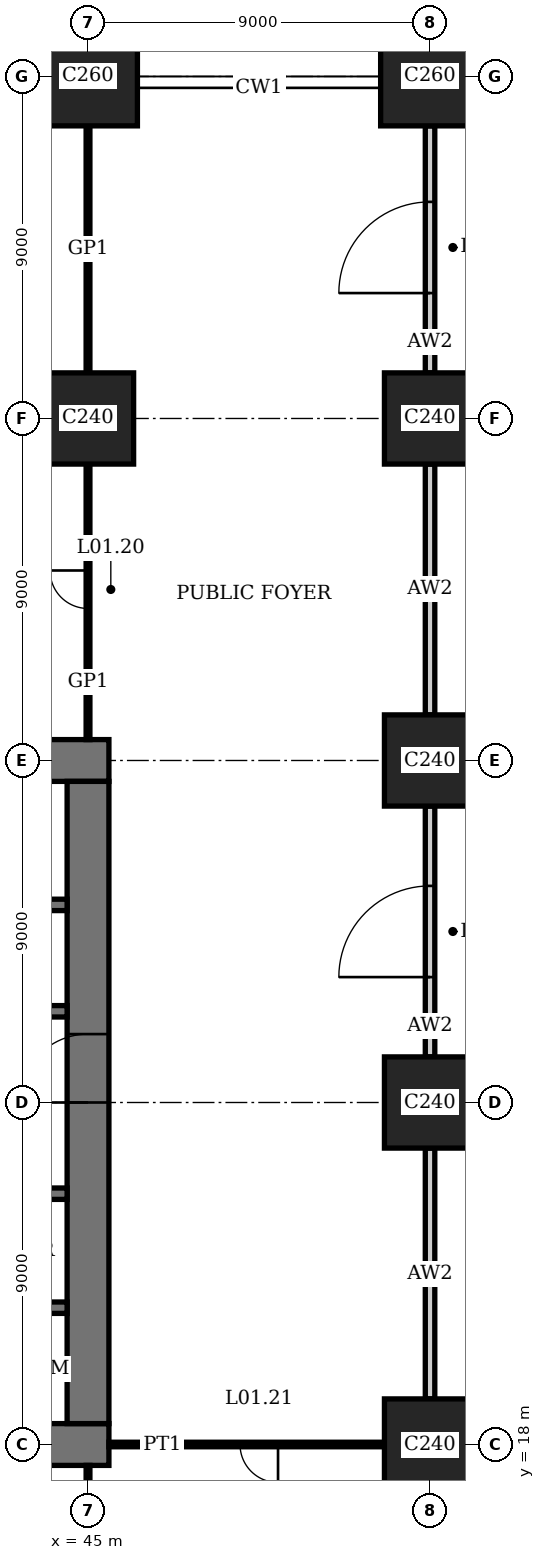
"""IFC4 building model, lengths in metres.
Left out: names, types, materials, properties, quantities, classifications, styles, units other than length and angle.
Written with IfcOpenShell. Run it as: python <this file> out.ifc"""

import sys

from ifc_helpers import new_model, si_unit, direction, frame, frame_2d, origin, origin_2d, place, context, subcontext, project, spatial, rectangle, extrude, element, fill, save


model = new_model("IFC4")
c1 = context("Model", 3, precision=1e-05, world=origin(), true_north=direction((0.0, 1.0)))
c2 = subcontext(c1, "Body", "Model", "MODEL_VIEW")
j1 = project(units=[si_unit("LENGTHUNIT", "METRE"), si_unit("PLANEANGLEUNIT", "RADIAN")], contexts=[c1])
p1 = place(None, origin())
s1 = spatial("IfcSite", under=j1, at=p1, CompositionType="ELEMENT")
p2 = place(p1, origin())
s2 = spatial("IfcBuilding", under=s1, at=p2, CompositionType="ELEMENT")
p3 = place(p2, frame((0.0, 0.0, 5.4)))
s3 = spatial("IfcBuildingStorey", under=s2, at=p3, CompositionType="ELEMENT", Elevation=5.4)
p4 = place(p3, frame((45.0, 45.0, 0.0), z_axis=(0.0, 0.0, 1.0), x_axis=(1.0, 0.0, 0.0)))
e1 = element("IfcColumn", 1, at=p4, inside=s3, PredefinedType="COLUMN", context=c2, shape_type="SweptSolid", body=[
    extrude(rectangle(XDim=2.4, YDim=2.4, at=origin_2d()), origin(), (0.0, 0.0, 1.0), 5.4),
])
p5 = place(p3, frame((45.0, 54.0, 0.0), z_axis=(0.0, 0.0, 1.0), x_axis=(1.0, 0.0, 0.0)))
e2 = element("IfcColumn", 2, at=p5, inside=s3, PredefinedType="COLUMN", context=c2, shape_type="SweptSolid", body=[
    extrude(rectangle(XDim=2.6, YDim=2.6, at=origin_2d()), origin(), (0.0, 0.0, 1.0), 5.4),
])
for number, where, z_axis, x_axis in (
    (3, (54.0, 18.0, 0.0), (0.0, 0.0, 1.0), (1.0, 0.0, 0.0)),
    (4, (54.0, 27.0, 0.0), (0.0, 0.0, 1.0), (1.0, 0.0, 0.0)),
    (5, (54.0, 36.0, 0.0), (0.0, 0.0, 1.0), (1.0, 0.0, 0.0)),
    (6, (54.0, 45.0, 0.0), (0.0, 0.0, 1.0), (1.0, 0.0, 0.0)),
):
    element("IfcColumn", number, at=place(p3, frame(where, z_axis=z_axis, x_axis=x_axis)), inside=s3, PredefinedType="COLUMN", context=c2, shape_type="SweptSolid", body=[
        extrude(rectangle(XDim=2.4, YDim=2.4, at=origin_2d()), origin(), (0.0, 0.0, 1.0), 5.4),
    ])
p6 = place(p3, frame((54.0, 54.0, 0.0), z_axis=(0.0, 0.0, 1.0), x_axis=(1.0, 0.0, 0.0)))
e7 = element("IfcColumn", 7, at=p6, inside=s3, PredefinedType="COLUMN", context=c2, shape_type="SweptSolid", body=[
    extrude(rectangle(XDim=2.6, YDim=2.6, at=origin_2d()), origin(), (0.0, 0.0, 1.0), 5.4),
])
p7 = place(p3, frame((17.45, 18.0, 0.0), z_axis=(0.0, 0.0, 1.0), x_axis=(1.0, 0.0, 0.0)))
e8 = element("IfcWall", 8, at=p7, inside=s3, PredefinedType="SHEAR", context=c2, shape_type="SweptSolid", body=[
    extrude(rectangle(XDim=28.1, YDim=1.1, at=frame_2d((14.05, 0.0))), origin(), (0.0, 0.0, 1.0), 5.4),
])
p8 = place(p7, frame((11.55, 0.0, 0.0)))
e9 = element("IfcOpeningElement", 9, at=p8, cuts=e8, PredefinedType="OPENING", context=c2, shape_type="SweptSolid", body=[
    extrude(rectangle(XDim=1.0, YDim=2.4, at=frame_2d((0.5, 1.2))), frame((0.0, 0.56, 0.0), z_axis=(0.0, -1.0, 0.0), x_axis=(1.0, 0.0, 0.0)), (0.0, 0.0, 1.0), 1.12),
])
p9 = place(p7, frame((16.55, 0.0, 0.0)))
e10 = element("IfcOpeningElement", 10, at=p9, cuts=e8, PredefinedType="OPENING", context=c2, shape_type="SweptSolid", body=[
    extrude(rectangle(XDim=1.0, YDim=2.4, at=frame_2d((0.5, 1.2))), frame((0.0, 0.56, 0.0), z_axis=(0.0, -1.0, 0.0), x_axis=(1.0, 0.0, 0.0)), (0.0, 0.0, 1.0), 1.12),
])
p10 = place(p7, frame((20.0, 0.0, 0.0)))
e11 = element("IfcOpeningElement", 11, at=p10, cuts=e8, PredefinedType="OPENING", context=c2, shape_type="SweptSolid", body=[
    extrude(rectangle(XDim=1.1, YDim=2.4, at=frame_2d((0.55, 1.2))), frame((0.0, 0.56, 0.0), z_axis=(0.0, -1.0, 0.0), x_axis=(1.0, 0.0, 0.0)), (0.0, 0.0, 1.0), 1.12),
])
p11 = place(p7, frame((24.05, 0.0, 0.0)))
e12 = element("IfcOpeningElement", 12, at=p11, cuts=e8, PredefinedType="OPENING", context=c2, shape_type="SweptSolid", body=[
    extrude(rectangle(XDim=1.0, YDim=2.4, at=frame_2d((0.5, 1.2))), frame((0.0, 0.56, 0.0), z_axis=(0.0, -1.0, 0.0), x_axis=(1.0, 0.0, 0.0)), (0.0, 0.0, 1.0), 1.12),
])
p12 = place(p3, frame((45.55, 36.0, 0.0), z_axis=(0.0, 0.0, 1.0), x_axis=(-1.0, 0.0, 0.0)))
e13 = element("IfcWall", 13, at=p12, inside=s3, PredefinedType="SHEAR", context=c2, shape_type="SweptSolid", body=[
    extrude(rectangle(XDim=28.1, YDim=1.1, at=frame_2d((14.05, 0.0))), origin(), (0.0, 0.0, 1.0), 5.4),
])
p13 = place(p12, frame((11.55, 0.0, 0.0)))
e14 = element("IfcOpeningElement", 14, at=p13, cuts=e13, PredefinedType="OPENING", context=c2, shape_type="SweptSolid", body=[
    extrude(rectangle(XDim=1.0, YDim=2.4, at=frame_2d((0.5, 1.2))), frame((0.0, 0.56, 0.0), z_axis=(0.0, -1.0, 0.0), x_axis=(1.0, 0.0, 0.0)), (0.0, 0.0, 1.0), 1.12),
])
p14 = place(p12, frame((16.55, 0.0, 0.0)))
e15 = element("IfcOpeningElement", 15, at=p14, cuts=e13, PredefinedType="OPENING", context=c2, shape_type="SweptSolid", body=[
    extrude(rectangle(XDim=1.0, YDim=2.4, at=frame_2d((0.5, 1.2))), frame((0.0, 0.56, 0.0), z_axis=(0.0, -1.0, 0.0), x_axis=(1.0, 0.0, 0.0)), (0.0, 0.0, 1.0), 1.12),
])
p15 = place(p12, frame((20.0, 0.0, 0.0)))
e16 = element("IfcOpeningElement", 16, at=p15, cuts=e13, PredefinedType="OPENING", context=c2, shape_type="SweptSolid", body=[
    extrude(rectangle(XDim=1.1, YDim=2.4, at=frame_2d((0.55, 1.2))), frame((0.0, 0.56, 0.0), z_axis=(0.0, -1.0, 0.0), x_axis=(1.0, 0.0, 0.0)), (0.0, 0.0, 1.0), 1.12),
])
p16 = place(p12, frame((24.05, 0.0, 0.0)))
e17 = element("IfcOpeningElement", 17, at=p16, cuts=e13, PredefinedType="OPENING", context=c2, shape_type="SweptSolid", body=[
    extrude(rectangle(XDim=1.0, YDim=2.4, at=frame_2d((0.5, 1.2))), frame((0.0, 0.56, 0.0), z_axis=(0.0, -1.0, 0.0), x_axis=(1.0, 0.0, 0.0)), (0.0, 0.0, 1.0), 1.12),
])
p17 = place(p3, frame((45.0, 18.55, 0.0), z_axis=(0.0, 0.0, 1.0), x_axis=(0.0, 1.0, 0.0)))
e18 = element("IfcWall", 18, at=p17, inside=s3, PredefinedType="SHEAR", context=c2, shape_type="SweptSolid", body=[
    extrude(rectangle(XDim=16.9, YDim=1.1, at=frame_2d((8.45, 0.0))), origin(), (0.0, 0.0, 1.0), 5.4),
])
p18 = place(p17, frame((8.45, 0.0, 0.0)))
e19 = element("IfcOpeningElement", 19, at=p18, cuts=e18, PredefinedType="OPENING", context=c2, shape_type="SweptSolid", body=[
    extrude(rectangle(XDim=1.8, YDim=2.4, at=frame_2d((0.9, 1.2))), frame((0.0, 0.56, 0.0), z_axis=(0.0, -1.0, 0.0), x_axis=(1.0, 0.0, 0.0)), (0.0, 0.0, 1.0), 1.12),
])
p19 = place(p3, frame((36.15, 32.2, 0.0), z_axis=(0.0, 0.0, 1.0), x_axis=(1.0, 0.0, 0.0)))
e20 = element("IfcWall", 20, at=p19, inside=s3, PredefinedType="SHEAR", context=c2, shape_type="SweptSolid", body=[
    extrude(rectangle(XDim=8.3, YDim=0.3, at=frame_2d((4.15, 0.0))), origin(), (0.0, 0.0, 1.0), 5.4),
])
p20 = place(p19, frame((0.45, 0.0, 0.0)))
e21 = element("IfcOpeningElement", 21, at=p20, cuts=e20, PredefinedType="OPENING", context=c2, shape_type="SweptSolid", body=[
    extrude(rectangle(XDim=1.0, YDim=2.4, at=frame_2d((0.5, 1.2))), frame((0.0, 0.16, 0.0), z_axis=(0.0, -1.0, 0.0), x_axis=(1.0, 0.0, 0.0)), (0.0, 0.0, 1.0), 0.32),
])
p21 = place(p3, frame((18.55, 24.6, 0.0), z_axis=(0.0, 0.0, 1.0), x_axis=(1.0, 0.0, 0.0)))
e22 = element("IfcWall", 22, at=p21, inside=s3, PredefinedType="SHEAR", context=c2, shape_type="SweptSolid", body=[
    extrude(rectangle(XDim=25.9, YDim=0.3, at=frame_2d((12.95, 0.0))), origin(), (0.0, 0.0, 1.0), 5.4),
])
p22 = place(p21, frame((4.95, 0.0, 0.0)))
e23 = element("IfcOpeningElement", 23, at=p22, cuts=e22, PredefinedType="OPENING", context=c2, shape_type="SweptSolid", body=[
    extrude(rectangle(XDim=1.0, YDim=2.4, at=frame_2d((0.5, 1.2))), frame((0.0, 0.16, 0.0), z_axis=(0.0, -1.0, 0.0), x_axis=(1.0, 0.0, 0.0)), (0.0, 0.0, 1.0), 0.32),
])
p23 = place(p21, frame((24.5, 0.0, 0.0)))
e24 = element("IfcOpeningElement", 24, at=p23, cuts=e22, PredefinedType="OPENING", context=c2, shape_type="SweptSolid", body=[
    extrude(rectangle(XDim=0.9, YDim=2.1, at=frame_2d((0.45, 1.05))), frame((0.0, 0.16, 0.0), z_axis=(0.0, -1.0, 0.0), x_axis=(1.0, 0.0, 0.0)), (0.0, 0.0, 1.0), 0.32),
])
p24 = place(p21, frame((9.4, 0.0, 0.0)))
e25 = element("IfcOpeningElement", 25, at=p24, cuts=e22, PredefinedType="OPENING", context=c2, shape_type="SweptSolid", body=[
    extrude(rectangle(XDim=1.1, YDim=2.4, at=frame_2d((0.55, 1.2))), frame((0.0, 0.16, 0.0), z_axis=(0.0, -1.0, 0.0), x_axis=(1.0, 0.0, 0.0)), (0.0, 0.0, 1.0), 0.32),
])
p25 = place(p21, frame((12.4, 0.0, 0.0)))
e26 = element("IfcOpeningElement", 26, at=p25, cuts=e22, PredefinedType="OPENING", context=c2, shape_type="SweptSolid", body=[
    extrude(rectangle(XDim=1.1, YDim=2.4, at=frame_2d((0.55, 1.2))), frame((0.0, 0.16, 0.0), z_axis=(0.0, -1.0, 0.0), x_axis=(1.0, 0.0, 0.0)), (0.0, 0.0, 1.0), 0.32),
])
p26 = place(p21, frame((15.4, 0.0, 0.0)))
e27 = element("IfcOpeningElement", 27, at=p26, cuts=e22, PredefinedType="OPENING", context=c2, shape_type="SweptSolid", body=[
    extrude(rectangle(XDim=1.1, YDim=2.4, at=frame_2d((0.55, 1.2))), frame((0.0, 0.16, 0.0), z_axis=(0.0, -1.0, 0.0), x_axis=(1.0, 0.0, 0.0)), (0.0, 0.0, 1.0), 0.32),
])
p27 = place(p21, frame((18.4, 0.0, 0.0)))
e28 = element("IfcOpeningElement", 28, at=p27, cuts=e22, PredefinedType="OPENING", context=c2, shape_type="SweptSolid", body=[
    extrude(rectangle(XDim=1.1, YDim=2.4, at=frame_2d((0.55, 1.2))), frame((0.0, 0.16, 0.0), z_axis=(0.0, -1.0, 0.0), x_axis=(1.0, 0.0, 0.0)), (0.0, 0.0, 1.0), 0.32),
])
p28 = place(p21, frame((21.3, 0.0, 0.0)))
e29 = element("IfcOpeningElement", 29, at=p28, cuts=e22, PredefinedType="OPENING", context=c2, shape_type="SweptSolid", body=[
    extrude(rectangle(XDim=1.3, YDim=2.4, at=frame_2d((0.65, 1.2))), frame((0.0, 0.16, 0.0), z_axis=(0.0, -1.0, 0.0), x_axis=(1.0, 0.0, 0.0)), (0.0, 0.0, 1.0), 0.32),
])
p29 = place(p3, frame((18.55, 29.4, 0.0), z_axis=(0.0, 0.0, 1.0), x_axis=(1.0, 0.0, 0.0)))
e30 = element("IfcWall", 30, at=p29, inside=s3, PredefinedType="SHEAR", context=c2, shape_type="SweptSolid", body=[
    extrude(rectangle(XDim=25.9, YDim=0.3, at=frame_2d((12.95, 0.0))), origin(), (0.0, 0.0, 1.0), 5.4),
])
p30 = place(p29, frame((19.95, 0.0, 0.0)))
e31 = element("IfcOpeningElement", 31, at=p30, cuts=e30, PredefinedType="OPENING", context=c2, shape_type="SweptSolid", body=[
    extrude(rectangle(XDim=1.0, YDim=2.4, at=frame_2d((0.5, 1.2))), frame((0.0, 0.16, 0.0), z_axis=(0.0, -1.0, 0.0), x_axis=(1.0, 0.0, 0.0)), (0.0, 0.0, 1.0), 0.32),
])
p31 = place(p29, frame((0.5, 0.0, 0.0)))
e32 = element("IfcOpeningElement", 32, at=p31, cuts=e30, PredefinedType="OPENING", context=c2, shape_type="SweptSolid", body=[
    extrude(rectangle(XDim=0.9, YDim=2.1, at=frame_2d((0.45, 1.05))), frame((0.0, 0.16, 0.0), z_axis=(0.0, -1.0, 0.0), x_axis=(1.0, 0.0, 0.0)), (0.0, 0.0, 1.0), 0.32),
])
p32 = place(p29, frame((3.3, 0.0, 0.0)))
e33 = element("IfcOpeningElement", 33, at=p32, cuts=e30, PredefinedType="OPENING", context=c2, shape_type="SweptSolid", body=[
    extrude(rectangle(XDim=1.3, YDim=2.4, at=frame_2d((0.65, 1.2))), frame((0.0, 0.16, 0.0), z_axis=(0.0, -1.0, 0.0), x_axis=(1.0, 0.0, 0.0)), (0.0, 0.0, 1.0), 0.32),
])
p33 = place(p3, frame((27.15, 21.6, 0.0), z_axis=(0.0, 0.0, 1.0), x_axis=(1.0, 0.0, 0.0)))
e34 = element("IfcWall", 34, at=p33, inside=s3, PredefinedType="SHEAR", context=c2, shape_type="SweptSolid", body=[
    extrude(rectangle(XDim=17.3, YDim=0.3, at=frame_2d((8.65, 0.0))), origin(), (0.0, 0.0, 1.0), 5.4),
])
p34 = place(p3, frame((54.0, 19.2, 0.0), z_axis=(0.0, 0.0, 1.0), x_axis=(0.0, 1.0, 0.0)))
e35 = element("IfcWall", 35, at=p34, inside=s3, PredefinedType="PARTITIONING", context=c2, shape_type="SweptSolid", body=[
    extrude(rectangle(XDim=6.6, YDim=0.25, at=frame_2d((3.3, 0.0))), origin(), (0.0, 0.0, 1.0), 4.3),
])
p35 = place(p3, frame((54.0, 28.2, 0.0), z_axis=(0.0, 0.0, 1.0), x_axis=(0.0, 1.0, 0.0)))
e36 = element("IfcWall", 36, at=p35, inside=s3, PredefinedType="PARTITIONING", context=c2, shape_type="SweptSolid", body=[
    extrude(rectangle(XDim=6.6, YDim=0.25, at=frame_2d((3.3, 0.0))), origin(), (0.0, 0.0, 1.0), 4.3),
])
p36 = place(p35, frame((2.1, 0.0, 0.0)))
e37 = element("IfcOpeningElement", 37, at=p36, cuts=e36, PredefinedType="OPENING", context=c2, shape_type="SweptSolid", body=[
    extrude(rectangle(XDim=2.4, YDim=3.0, at=frame_2d((1.2, 1.5))), frame((0.0, 0.135, 0.0), z_axis=(0.0, -1.0, 0.0), x_axis=(1.0, 0.0, 0.0)), (0.0, 0.0, 1.0), 0.27),
])
p37 = place(p3, frame((54.0, 37.2, 0.0), z_axis=(0.0, 0.0, 1.0), x_axis=(0.0, 1.0, 0.0)))
e38 = element("IfcWall", 38, at=p37, inside=s3, PredefinedType="PARTITIONING", context=c2, shape_type="SweptSolid", body=[
    extrude(rectangle(XDim=6.6, YDim=0.25, at=frame_2d((3.3, 0.0))), origin(), (0.0, 0.0, 1.0), 4.3),
])
p38 = place(p3, frame((54.0, 46.2, 0.0), z_axis=(0.0, 0.0, 1.0), x_axis=(0.0, 1.0, 0.0)))
e39 = element("IfcWall", 39, at=p38, inside=s3, PredefinedType="PARTITIONING", context=c2, shape_type="SweptSolid", body=[
    extrude(rectangle(XDim=6.5, YDim=0.25, at=frame_2d((3.25, 0.0))), origin(), (0.0, 0.0, 1.0), 4.3),
])
p39 = place(p38, frame((2.1, 0.0, 0.0)))
e40 = element("IfcOpeningElement", 40, at=p39, cuts=e39, PredefinedType="OPENING", context=c2, shape_type="SweptSolid", body=[
    extrude(rectangle(XDim=2.4, YDim=3.0, at=frame_2d((1.2, 1.5))), frame((0.0, 0.135, 0.0), z_axis=(0.0, -1.0, 0.0), x_axis=(1.0, 0.0, 0.0)), (0.0, 0.0, 1.0), 0.27),
])
p40 = place(p3, frame((45.0, 10.2, 0.0), z_axis=(0.0, 0.0, 1.0), x_axis=(0.0, 1.0, 0.0)))
e41 = element("IfcWall", 41, at=p40, inside=s3, PredefinedType="PARTITIONING", context=c2, shape_type="SweptSolid", body=[
    extrude(rectangle(XDim=7.25, YDim=0.1, at=frame_2d((3.625, 0.0))), origin(), (0.0, 0.0, 1.0), 4.3),
])
p41 = place(p40, frame((2.8, 0.0, 0.0)))
e42 = element("IfcOpeningElement", 42, at=p41, cuts=e41, PredefinedType="OPENING", context=c2, shape_type="SweptSolid", body=[
    extrude(rectangle(XDim=1.0, YDim=2.4, at=frame_2d((0.5, 1.2))), frame((0.0, 0.06, 0.0), z_axis=(0.0, -1.0, 0.0), x_axis=(1.0, 0.0, 0.0)), (0.0, 0.0, 1.0), 0.12),
])
p42 = place(p3, frame((45.0, 36.55, 0.0), z_axis=(0.0, 0.0, 1.0), x_axis=(0.0, 1.0, 0.0)))
e43 = element("IfcWall", 43, at=p42, inside=s3, PredefinedType="PARTITIONING", context=c2, shape_type="SweptSolid", body=[
    extrude(rectangle(XDim=7.25, YDim=0.1, at=frame_2d((3.625, 0.0))), origin(), (0.0, 0.0, 1.0), 4.3),
])
p43 = place(p42, frame((3.45, 0.0, 0.0)))
e44 = element("IfcOpeningElement", 44, at=p43, cuts=e43, PredefinedType="OPENING", context=c2, shape_type="SweptSolid", body=[
    extrude(rectangle(XDim=1.0, YDim=2.4, at=frame_2d((0.5, 1.2))), frame((0.0, 0.06, 0.0), z_axis=(0.0, -1.0, 0.0), x_axis=(1.0, 0.0, 0.0)), (0.0, 0.0, 1.0), 0.12),
])
p44 = place(p3, frame((45.0, 46.2, 0.0), z_axis=(0.0, 0.0, 1.0), x_axis=(0.0, 1.0, 0.0)))
e45 = element("IfcWall", 45, at=p44, inside=s3, PredefinedType="PARTITIONING", context=c2, shape_type="SweptSolid", body=[
    extrude(rectangle(XDim=6.5, YDim=0.1, at=frame_2d((3.25, 0.0))), origin(), (0.0, 0.0, 1.0), 4.3),
])
p45 = place(p3, frame((45.55, 18.0, 0.0), z_axis=(0.0, 0.0, 1.0), x_axis=(1.0, 0.0, 0.0)))
e46 = element("IfcWall", 46, at=p45, inside=s3, PredefinedType="PARTITIONING", context=c2, shape_type="SweptSolid", body=[
    extrude(rectangle(XDim=7.25, YDim=0.12, at=frame_2d((3.625, 0.0))), origin(), (0.0, 0.0, 1.0), 4.3),
])
p46 = place(p45, frame((3.45, 0.0, 0.0)))
e47 = element("IfcOpeningElement", 47, at=p46, cuts=e46, PredefinedType="OPENING", context=c2, shape_type="SweptSolid", body=[
    extrude(rectangle(XDim=1.0, YDim=2.4, at=frame_2d((0.5, 1.2))), frame((0.0, 0.07, 0.0), z_axis=(0.0, -1.0, 0.0), x_axis=(1.0, 0.0, 0.0)), (0.0, 0.0, 1.0), 0.14),
])
p47 = place(p18, origin())
e48 = element("IfcDoor", 48, at=p47, inside=s3, OperationType="DOUBLE_DOOR_DOUBLE_SWING", PredefinedType="DOOR", context=c2, shape_type="SweptSolid", body=[
    extrude(rectangle(XDim=1.8, YDim=2.4, at=frame_2d((0.9, 1.2))), frame((0.0, 0.03, 0.0), z_axis=(0.0, -1.0, 0.0), x_axis=(1.0, 0.0, 0.0)), (0.0, 0.0, 1.0), 0.06),
    extrude(rectangle(XDim=0.04, YDim=2.4, at=frame_2d((0.02, 1.2))), frame((0.0, 0.55, 0.0), z_axis=(0.0, -1.0, 0.0), x_axis=(1.0, 0.0, 0.0)), (0.0, 0.0, 1.0), 1.1),
    extrude(rectangle(XDim=0.04, YDim=2.4, at=frame_2d((1.78, 1.2))), frame((0.0, 0.55, 0.0), z_axis=(0.0, -1.0, 0.0), x_axis=(1.0, 0.0, 0.0)), (0.0, 0.0, 1.0), 1.1),
    extrude(rectangle(XDim=1.8, YDim=0.04, at=frame_2d((0.9, 2.38))), frame((0.0, 0.55, 0.0), z_axis=(0.0, -1.0, 0.0), x_axis=(1.0, 0.0, 0.0)), (0.0, 0.0, 1.0), 1.1),
])
fill(e19, e48)
p48 = place(p36, origin())
e49 = element("IfcDoor", 49, at=p48, inside=s3, OperationType="DOUBLE_DOOR_DOUBLE_SWING", PredefinedType="DOOR", context=c2, shape_type="SweptSolid", body=[
    extrude(rectangle(XDim=2.4, YDim=3.0, at=frame_2d((1.2, 1.5))), frame((0.0, 0.03, 0.0), z_axis=(0.0, -1.0, 0.0), x_axis=(1.0, 0.0, 0.0)), (0.0, 0.0, 1.0), 0.06),
])
fill(e37, e49)
p49 = place(p39, origin())
e50 = element("IfcDoor", 50, at=p49, inside=s3, OperationType="DOUBLE_DOOR_DOUBLE_SWING", PredefinedType="DOOR", context=c2, shape_type="SweptSolid", body=[
    extrude(rectangle(XDim=2.4, YDim=3.0, at=frame_2d((1.2, 1.5))), frame((0.0, 0.03, 0.0), z_axis=(0.0, -1.0, 0.0), x_axis=(1.0, 0.0, 0.0)), (0.0, 0.0, 1.0), 0.06),
])
fill(e40, e50)
p50 = place(p43, origin())
e51 = element("IfcDoor", 51, at=p50, inside=s3, OperationType="SINGLE_SWING_LEFT", PredefinedType="DOOR", context=c2, shape_type="SweptSolid", body=[
    extrude(rectangle(XDim=1.0, YDim=2.4, at=frame_2d((0.5, 1.2))), frame((0.0, 0.02, 0.0), z_axis=(0.0, -1.0, 0.0), x_axis=(1.0, 0.0, 0.0)), (0.0, 0.0, 1.0), 0.04),
])
fill(e44, e51)
p51 = place(p46, origin())
e52 = element("IfcDoor", 52, at=p51, inside=s3, OperationType="SINGLE_SWING_RIGHT", PredefinedType="DOOR", context=c2, shape_type="SweptSolid", body=[
    extrude(rectangle(XDim=1.0, YDim=2.4, at=frame_2d((0.5, 1.2))), frame((0.0, 0.025, 0.0), z_axis=(0.0, -1.0, 0.0), x_axis=(1.0, 0.0, 0.0)), (0.0, 0.0, 1.0), 0.05),
])
fill(e47, e52)
save(model, sys.argv[1])
